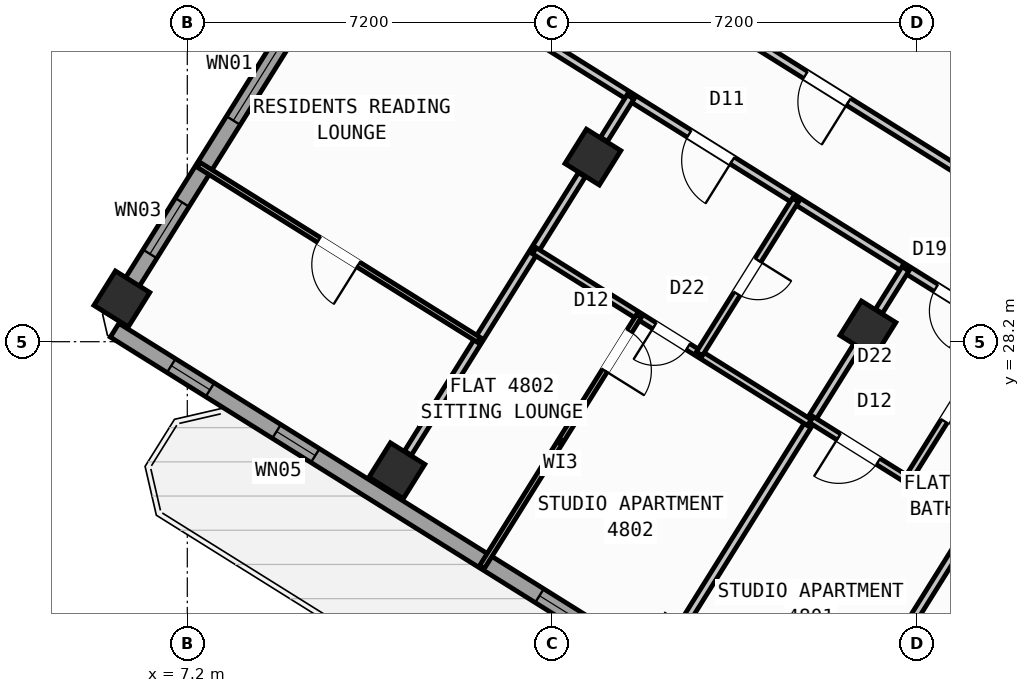
"""IFC4 building model, lengths in metres.
Left out: names, types, materials, properties, quantities, classifications, styles, units other than length and angle.
Written with IfcOpenShell. Run it as: python <this file> out.ifc"""

import sys

from ifc_helpers import new_model, si_unit, direction, frame, frame_2d, origin, origin_2d, place, context, subcontext, project, spatial, rectangle, hollow_rectangle, extrude, source, transform, mapped, element, fill, save


model = new_model("IFC4")
c1 = context("Model", 3, precision=1e-05, world=origin(), true_north=direction((0.0, 1.0)))
c2 = subcontext(c1, "Body", "Model", "MODEL_VIEW")
j1 = project(units=[si_unit("LENGTHUNIT", "METRE"), si_unit("PLANEANGLEUNIT", "RADIAN")], contexts=[c1])
p1 = place(None, origin())
s1 = spatial("IfcSite", under=j1, at=p1, CompositionType="ELEMENT")
p2 = place(p1, origin())
s2 = spatial("IfcBuilding", under=s1, at=p2, CompositionType="ELEMENT")
p3 = place(p2, frame((0.0, 0.0, 191.4)))
s3 = spatial("IfcBuildingStorey", under=s2, at=p3, CompositionType="ELEMENT", Elevation=191.4)
m1 = source(origin(), c2, "Body", "SweptSolid", [
    extrude(hollow_rectangle(XDim=0.8, YDim=0.8, WallThickness=0.032, at=origin_2d()), origin(), (0.0, 0.0, 1.0), 3.6),
])
for number, where, z_axis, x_axis in (
    (1, (20.632, 28.452, 0.0), (0.0, 0.0, 1.0), (-0.848, 0.53, 0.0)),
    (2, (15.205, 31.844, 0.0), (0.0, 0.0, 1.0), (-0.848, 0.53, 0.0)),
    (3, (11.336, 25.653, 0.0), (0.0, 0.0, 1.0), (-0.848, 0.53, 0.0)),
    (4, (5.909, 29.044, 0.0), (0.0, 0.0, 1.0), (-0.848, 0.53, 0.0)),
):
    element("IfcColumn", number, at=place(p3, frame(where, z_axis=z_axis, x_axis=x_axis)), inside=s3, PredefinedType="COLUMN", context=c2, shape_type="MappedRepresentation", body=[
        mapped(m1, transform((0.0, 0.0, 0.0), scale=1.0)),
    ])
p4 = place(p3, frame((31.76, 12.183, 0.0), z_axis=(0.0, 0.0, 1.0), x_axis=(-0.848047074256, 0.529920899612, 0.0)))
e5 = element("IfcWall", 5, at=p4, inside=s3, PredefinedType="STANDARD", context=c2, shape_type="SweptSolid", body=[
    extrude(rectangle(XDim=30.652, YDim=0.32, at=frame_2d((15.326, 0.0))), origin(), (0.0, 0.0, 1.0), 3.32),
])
p5 = place(p4, frame((15.166, 0.0, 0.0)))
e6 = element("IfcOpeningElement", 6, at=p5, cuts=e5, PredefinedType="OPENING", context=c2, shape_type="SweptSolid", body=[
    extrude(rectangle(XDim=1.2, YDim=2.15, at=frame_2d((0.6, 1.075))), frame((0.0, 0.17, 0.0), z_axis=(0.0, -1.0, 0.0), x_axis=(1.0, 0.0, 0.0)), (0.0, 0.0, 1.0), 0.34),
])
p6 = place(p4, frame((2.015, 0.0, 0.8)))
e7 = element("IfcOpeningElement", 7, at=p6, cuts=e5, PredefinedType="OPENING", context=c2, shape_type="SweptSolid", body=[
    extrude(rectangle(XDim=2.1, YDim=1.55, at=frame_2d((1.05, 0.775))), frame((0.0, 0.17, 0.0), z_axis=(0.0, -1.0, 0.0), x_axis=(1.0, 0.0, 0.0)), (0.0, 0.0, 1.0), 0.34),
])
p7 = place(p4, frame((7.244, 0.0, 0.8)))
e8 = element("IfcOpeningElement", 8, at=p7, cuts=e5, PredefinedType="OPENING", context=c2, shape_type="SweptSolid", body=[
    extrude(rectangle(XDim=2.1, YDim=1.55, at=frame_2d((1.05, 0.775))), frame((0.0, 0.17, 0.0), z_axis=(0.0, -1.0, 0.0), x_axis=(1.0, 0.0, 0.0)), (0.0, 0.0, 1.0), 0.34),
])
p8 = place(p4, frame((12.623, 0.0, 1.0)))
e9 = element("IfcOpeningElement", 9, at=p8, cuts=e5, PredefinedType="OPENING", context=c2, shape_type="SweptSolid", body=[
    extrude(rectangle(XDim=0.9, YDim=1.25, at=frame_2d((0.45, 0.625))), frame((0.0, 0.17, 0.0), z_axis=(0.0, -1.0, 0.0), x_axis=(1.0, 0.0, 0.0)), (0.0, 0.0, 1.0), 0.34),
])
p9 = place(p4, frame((19.565, 0.0, 0.95)))
e10 = element("IfcOpeningElement", 10, at=p9, cuts=e5, PredefinedType="OPENING", context=c2, shape_type="SweptSolid", body=[
    extrude(rectangle(XDim=1.2, YDim=1.4, at=frame_2d((0.6, 0.7))), frame((0.0, 0.17, 0.0), z_axis=(0.0, -1.0, 0.0), x_axis=(1.0, 0.0, 0.0)), (0.0, 0.0, 1.0), 0.34),
])
p10 = place(p4, frame((25.983, 0.0, 1.0)))
e11 = element("IfcOpeningElement", 11, at=p10, cuts=e5, PredefinedType="OPENING", context=c2, shape_type="SweptSolid", body=[
    extrude(rectangle(XDim=0.9, YDim=1.25, at=frame_2d((0.45, 0.625))), frame((0.0, 0.17, 0.0), z_axis=(0.0, -1.0, 0.0), x_axis=(1.0, 0.0, 0.0)), (0.0, 0.0, 1.0), 0.34),
])
p11 = place(p4, frame((28.433, 0.0, 1.0)))
e12 = element("IfcOpeningElement", 12, at=p11, cuts=e5, PredefinedType="OPENING", context=c2, shape_type="SweptSolid", body=[
    extrude(rectangle(XDim=0.9, YDim=1.25, at=frame_2d((0.45, 0.625))), frame((0.0, 0.17, 0.0), z_axis=(0.0, -1.0, 0.0), x_axis=(1.0, 0.0, 0.0)), (0.0, 0.0, 1.0), 0.34),
])
p12 = place(p3, frame((5.7, 28.71, 0.0), z_axis=(0.0, 0.0, 1.0), x_axis=(0.529923711467, 0.8480453172, 0.0)))
e13 = element("IfcWall", 13, at=p12, inside=s3, PredefinedType="STANDARD", context=c2, shape_type="SweptSolid", body=[
    extrude(rectangle(XDim=21.587, YDim=0.32, at=frame_2d((10.794, 0.0))), origin(), (0.0, 0.0, 1.0), 2.795),
])
p13 = place(p12, frame((1.44, 0.0, 0.95)))
e14 = element("IfcOpeningElement", 14, at=p13, cuts=e13, PredefinedType="OPENING", context=c2, shape_type="SweptSolid", body=[
    extrude(rectangle(XDim=1.2, YDim=1.4, at=frame_2d((0.6, 0.7))), frame((0.0, 0.17, 0.0), z_axis=(0.0, -1.0, 0.0), x_axis=(1.0, 0.0, 0.0)), (0.0, 0.0, 1.0), 0.34),
])
p14 = place(p12, frame((4.545, 0.0, 0.85)))
e15 = element("IfcOpeningElement", 15, at=p14, cuts=e13, PredefinedType="OPENING", context=c2, shape_type="SweptSolid", body=[
    extrude(rectangle(XDim=1.8, YDim=1.5, at=frame_2d((0.9, 0.75))), frame((0.0, 0.17, 0.0), z_axis=(0.0, -1.0, 0.0), x_axis=(1.0, 0.0, 0.0)), (0.0, 0.0, 1.0), 0.34),
])
p15 = place(p12, frame((12.139, 0.0, 1.0)))
e16 = element("IfcOpeningElement", 16, at=p15, cuts=e13, PredefinedType="OPENING", context=c2, shape_type="SweptSolid", body=[
    extrude(rectangle(XDim=0.9, YDim=1.25, at=frame_2d((0.45, 0.625))), frame((0.0, 0.17, 0.0), z_axis=(0.0, -1.0, 0.0), x_axis=(1.0, 0.0, 0.0)), (0.0, 0.0, 1.0), 0.34),
])
p16 = place(p12, frame((16.35, 0.0, 0.95)))
e17 = element("IfcOpeningElement", 17, at=p16, cuts=e13, PredefinedType="OPENING", context=c2, shape_type="SweptSolid", body=[
    extrude(rectangle(XDim=1.2, YDim=1.4, at=frame_2d((0.6, 0.7))), frame((0.0, 0.17, 0.0), z_axis=(0.0, -1.0, 0.0), x_axis=(1.0, 0.0, 0.0)), (0.0, 0.0, 1.0), 0.34),
])
p17 = place(p12, frame((18.762, 0.0, 0.95)))
e18 = element("IfcOpeningElement", 18, at=p17, cuts=e13, PredefinedType="OPENING", context=c2, shape_type="SweptSolid", body=[
    extrude(rectangle(XDim=1.2, YDim=1.4, at=frame_2d((0.6, 0.7))), frame((0.0, 0.17, 0.0), z_axis=(0.0, -1.0, 0.0), x_axis=(1.0, 0.0, 0.0)), (0.0, 0.0, 1.0), 0.34),
])
p18 = place(p3, frame((17.424, 47.083, 0.0), z_axis=(0.0, 0.0, 1.0), x_axis=(0.848049927979, -0.529916332693, 0.0)))
e19 = element("IfcWall", 19, at=p18, inside=s3, PredefinedType="STANDARD", context=c2, shape_type="SweptSolid", body=[
    extrude(rectangle(XDim=29.223, YDim=0.32, at=frame_2d((14.612, 0.0))), origin(), (0.0, 0.0, 1.0), 3.32),
])
p19 = place(p18, frame((3.764, 0.0, 0.0)))
e20 = element("IfcOpeningElement", 20, at=p19, cuts=e19, PredefinedType="OPENING", context=c2, shape_type="SweptSolid", body=[
    extrude(rectangle(XDim=1.05, YDim=2.15, at=frame_2d((0.525, 1.075))), frame((0.0, 0.17, 0.0), z_axis=(0.0, -1.0, 0.0), x_axis=(1.0, 0.0, 0.0)), (0.0, 0.0, 1.0), 0.34),
])
p20 = place(p18, frame((8.344, 0.0, 0.8)))
e21 = element("IfcOpeningElement", 21, at=p20, cuts=e19, PredefinedType="OPENING", context=c2, shape_type="SweptSolid", body=[
    extrude(rectangle(XDim=2.1, YDim=1.55, at=frame_2d((1.05, 0.775))), frame((0.0, 0.17, 0.0), z_axis=(0.0, -1.0, 0.0), x_axis=(1.0, 0.0, 0.0)), (0.0, 0.0, 1.0), 0.34),
])
p21 = place(p18, frame((13.589, 0.0, 0.85)))
e22 = element("IfcOpeningElement", 22, at=p21, cuts=e19, PredefinedType="OPENING", context=c2, shape_type="SweptSolid", body=[
    extrude(rectangle(XDim=1.8, YDim=1.5, at=frame_2d((0.9, 0.75))), frame((0.0, 0.17, 0.0), z_axis=(0.0, -1.0, 0.0), x_axis=(1.0, 0.0, 0.0)), (0.0, 0.0, 1.0), 0.34),
])
p22 = place(p18, frame((17.104, 0.0, 0.95)))
e23 = element("IfcOpeningElement", 23, at=p22, cuts=e19, PredefinedType="OPENING", context=c2, shape_type="SweptSolid", body=[
    extrude(rectangle(XDim=1.2, YDim=1.4, at=frame_2d((0.6, 0.7))), frame((0.0, 0.17, 0.0), z_axis=(0.0, -1.0, 0.0), x_axis=(1.0, 0.0, 0.0)), (0.0, 0.0, 1.0), 0.34),
])
p23 = place(p18, frame((21.214, 0.0, 0.95)))
e24 = element("IfcOpeningElement", 24, at=p23, cuts=e19, PredefinedType="OPENING", context=c2, shape_type="SweptSolid", body=[
    extrude(rectangle(XDim=1.2, YDim=1.4, at=frame_2d((0.6, 0.7))), frame((0.0, 0.17, 0.0), z_axis=(0.0, -1.0, 0.0), x_axis=(1.0, 0.0, 0.0)), (0.0, 0.0, 1.0), 0.34),
])
p24 = place(p18, frame((25.853, 0.0, 0.95)))
e25 = element("IfcOpeningElement", 25, at=p24, cuts=e19, PredefinedType="OPENING", context=c2, shape_type="SweptSolid", body=[
    extrude(rectangle(XDim=1.2, YDim=1.4, at=frame_2d((0.6, 0.7))), frame((0.0, 0.17, 0.0), z_axis=(0.0, -1.0, 0.0), x_axis=(1.0, 0.0, 0.0)), (0.0, 0.0, 1.0), 0.34),
])
p25 = place(p3, frame((24.588, 27.631, 0.0), z_axis=(0.0, 0.0, 1.0), x_axis=(-0.529914992377, -0.848050765494, 0.0)))
e26 = element("IfcWall", 26, at=p25, inside=s3, PredefinedType="PARTITIONING", context=c2, shape_type="SweptSolid", body=[
    extrude(rectangle(XDim=9.15, YDim=0.16, at=frame_2d((4.575, 0.0))), origin(), (0.0, 0.0, 1.0), 3.31),
])
p26 = place(p3, frame((25.754, 29.497, 0.0), z_axis=(0.0, 0.0, 1.0), x_axis=(-0.848045850158, 0.529922858565, 0.0)))
e27 = element("IfcWall", 27, at=p26, inside=s3, PredefinedType="PARTITIONING", context=c2, shape_type="SweptSolid", body=[
    extrude(rectangle(XDim=16.73, YDim=0.16, at=frame_2d((8.365, 0.0))), origin(), (0.0, 0.0, 1.0), 3.31),
])
p27 = place(p26, frame((2.22, 0.0, 0.0)))
e28 = element("IfcOpeningElement", 28, at=p27, cuts=e27, PredefinedType="OPENING", context=c2, shape_type="SweptSolid", body=[
    extrude(rectangle(XDim=0.86, YDim=2.05, at=frame_2d((0.43, 1.025))), frame((0.0, 0.09, 0.0), z_axis=(0.0, -1.0, 0.0), x_axis=(1.0, 0.0, 0.0)), (0.0, 0.0, 1.0), 0.18),
])
p28 = place(p26, frame((6.49, 0.0, 0.0)))
e29 = element("IfcOpeningElement", 29, at=p28, cuts=e27, PredefinedType="OPENING", context=c2, shape_type="SweptSolid", body=[
    extrude(rectangle(XDim=1.0, YDim=2.1, at=frame_2d((0.5, 1.05))), frame((0.0, 0.09, 0.0), z_axis=(0.0, -1.0, 0.0), x_axis=(1.0, 0.0, 0.0)), (0.0, 0.0, 1.0), 0.18),
])
p29 = place(p26, frame((14.304, 0.0, 0.0)))
e30 = element("IfcOpeningElement", 30, at=p29, cuts=e27, PredefinedType="OPENING", context=c2, shape_type="SweptSolid", body=[
    extrude(rectangle(XDim=1.0, YDim=2.1, at=frame_2d((0.5, 1.05))), frame((0.0, 0.09, 0.0), z_axis=(0.0, -1.0, 0.0), x_axis=(1.0, 0.0, 0.0)), (0.0, 0.0, 1.0), 0.18),
])
p30 = place(p3, frame((24.588, 27.631, 0.0), z_axis=(0.0, 0.0, 1.0), x_axis=(-0.848041752158, 0.529929416617, 0.0)))
e31 = element("IfcWall", 31, at=p30, inside=s3, PredefinedType="PARTITIONING", context=c2, shape_type="SweptSolid", body=[
    extrude(rectangle(XDim=16.73, YDim=0.16, at=frame_2d((8.365, 0.0))), origin(), (0.0, 0.0, 1.0), 3.31),
])
p31 = place(p30, frame((2.22, 0.0, 0.0)))
e32 = element("IfcOpeningElement", 32, at=p31, cuts=e31, PredefinedType="OPENING", context=c2, shape_type="SweptSolid", body=[
    extrude(rectangle(XDim=0.86, YDim=2.05, at=frame_2d((0.43, 1.025))), frame((0.0, 0.09, 0.0), z_axis=(0.0, -1.0, 0.0), x_axis=(1.0, 0.0, 0.0)), (0.0, 0.0, 1.0), 0.18),
])
p32 = place(p30, frame((7.82, 0.0, 0.0)))
e33 = element("IfcOpeningElement", 33, at=p32, cuts=e31, PredefinedType="OPENING", context=c2, shape_type="SweptSolid", body=[
    extrude(rectangle(XDim=1.0, YDim=2.1, at=frame_2d((0.5, 1.05))), frame((0.0, 0.09, 0.0), z_axis=(0.0, -1.0, 0.0), x_axis=(1.0, 0.0, 0.0)), (0.0, 0.0, 1.0), 0.18),
])
p33 = place(p30, frame((12.95, 0.0, 0.0)))
e34 = element("IfcOpeningElement", 34, at=p33, cuts=e31, PredefinedType="OPENING", context=c2, shape_type="SweptSolid", body=[
    extrude(rectangle(XDim=1.0, YDim=2.1, at=frame_2d((0.5, 1.05))), frame((0.0, 0.09, 0.0), z_axis=(0.0, -1.0, 0.0), x_axis=(1.0, 0.0, 0.0)), (0.0, 0.0, 1.0), 0.18),
])
p34 = place(p3, frame((21.374, 29.639, 0.0), z_axis=(0.0, 0.0, 1.0), x_axis=(-0.529998940003, -0.847998304005, 0.0)))
e35 = element("IfcWall", 35, at=p34, inside=s3, PredefinedType="PARTITIONING", context=c2, shape_type="SweptSolid", body=[
    extrude(rectangle(XDim=0.988, YDim=0.16, at=frame_2d((0.494, 0.0))), origin(), (0.0, 0.0, 1.0), 2.795),
])
p35 = place(p3, frame((20.414, 28.103, 0.0), z_axis=(0.0, 0.0, 1.0), x_axis=(-0.529934553702, -0.848038542045, 0.0)))
e36 = element("IfcWall", 36, at=p35, inside=s3, PredefinedType="PARTITIONING", context=c2, shape_type="SweptSolid", body=[
    extrude(rectangle(XDim=6.476, YDim=0.16, at=frame_2d((3.238, 0.0))), origin(), (0.0, 0.0, 1.0), 2.795),
])
p36 = place(p3, frame((22.728, 24.654, 0.0), z_axis=(0.0, 0.0, 1.0), x_axis=(-0.848059820872, 0.529900500304, 0.0)))
e37 = element("IfcWall", 37, at=p36, inside=s3, PredefinedType="PLUMBINGWALL", context=c2, shape_type="SweptSolid", body=[
    extrude(rectangle(XDim=3.79, YDim=0.14, at=frame_2d((1.895, 0.0))), origin(), (0.0, 0.0, 1.0), 3.31),
])
p37 = place(p36, frame((2.23, 0.0, 0.0)))
e38 = element("IfcOpeningElement", 38, at=p37, cuts=e37, PredefinedType="OPENING", context=c2, shape_type="SweptSolid", body=[
    extrude(rectangle(XDim=0.92, YDim=2.08, at=frame_2d((0.46, 1.04))), frame((0.0, 0.08, 0.0), z_axis=(0.0, -1.0, 0.0), x_axis=(1.0, 0.0, 0.0)), (0.0, 0.0, 1.0), 0.16),
])
p38 = place(p3, frame((23.273, 28.452, 0.0), z_axis=(0.0, 0.0, 1.0), x_axis=(-0.529867639402, -0.848080352747, 0.0)))
e39 = element("IfcWall", 39, at=p38, inside=s3, PredefinedType="PLUMBINGWALL", context=c2, shape_type="SweptSolid", body=[
    extrude(rectangle(XDim=3.51, YDim=0.14, at=frame_2d((1.755, 0.0))), origin(), (0.0, 0.0, 1.0), 2.935),
])
p39 = place(p38, frame((1.365, 0.0, 0.0)))
e40 = element("IfcOpeningElement", 40, at=p39, cuts=e39, PredefinedType="OPENING", context=c2, shape_type="SweptSolid", body=[
    extrude(rectangle(XDim=0.78, YDim=2.05, at=frame_2d((0.39, 1.025))), frame((0.0, 0.08, 0.0), z_axis=(0.0, -1.0, 0.0), x_axis=(1.0, 0.0, 0.0)), (0.0, 0.0, 1.0), 0.16),
])
p40 = place(p3, frame((15.946, 33.031, 0.0), z_axis=(0.0, 0.0, 1.0), x_axis=(-0.529821225456, -0.848109349704, 0.0)))
e41 = element("IfcWall", 41, at=p40, inside=s3, PredefinedType="PARTITIONING", context=c2, shape_type="SweptSolid", body=[
    extrude(rectangle(XDim=0.988, YDim=0.16, at=frame_2d((0.494, 0.0))), origin(), (0.0, 0.0, 1.0), 2.795),
])
p41 = place(p3, frame((14.986, 31.494, 0.0), z_axis=(0.0, 0.0, 1.0), x_axis=(-0.529907440938, -0.848055484057, 0.0)))
e42 = element("IfcWall", 42, at=p41, inside=s3, PredefinedType="PARTITIONING", context=c2, shape_type="SweptSolid", body=[
    extrude(rectangle(XDim=6.476, YDim=0.16, at=frame_2d((3.238, 0.0))), origin(), (0.0, 0.0, 1.0), 2.795),
])
p42 = place(p3, frame((19.477, 26.603, 0.0), z_axis=(0.0, 0.0, 1.0), x_axis=(-0.848039019877, 0.529933789039, 0.0)))
e43 = element("IfcWall", 43, at=p42, inside=s3, PredefinedType="PLUMBINGWALL", context=c2, shape_type="SweptSolid", body=[
    extrude(rectangle(XDim=6.4, YDim=0.14, at=frame_2d((3.2, 0.0))), origin(), (0.0, 0.0, 1.0), 3.31),
])
p43 = place(p42, frame((2.824, 0.0, 0.0)))
e44 = element("IfcOpeningElement", 44, at=p43, cuts=e43, PredefinedType="OPENING", context=c2, shape_type="SweptSolid", body=[
    extrude(rectangle(XDim=0.78, YDim=2.05, at=frame_2d((0.39, 1.025))), frame((0.0, 0.08, 0.0), z_axis=(0.0, -1.0, 0.0), x_axis=(1.0, 0.0, 0.0)), (0.0, 0.0, 1.0), 0.16),
])
p44 = place(p3, frame((19.203, 30.996, 0.0), z_axis=(0.0, 0.0, 1.0), x_axis=(-0.529906983049, -0.848055770169, 0.0)))
e45 = element("IfcWall", 45, at=p44, inside=s3, PredefinedType="PLUMBINGWALL", context=c2, shape_type="SweptSolid", body=[
    extrude(rectangle(XDim=3.58, YDim=0.14, at=frame_2d((1.79, 0.0))), origin(), (0.0, 0.0, 1.0), 3.31),
])
p45 = place(p44, frame((1.4, 0.0, 0.0)))
e46 = element("IfcOpeningElement", 46, at=p45, cuts=e45, PredefinedType="OPENING", context=c2, shape_type="SweptSolid", body=[
    extrude(rectangle(XDim=0.78, YDim=2.05, at=frame_2d((0.39, 1.025))), frame((0.0, 0.08, 0.0), z_axis=(0.0, -1.0, 0.0), x_axis=(1.0, 0.0, 0.0)), (0.0, 0.0, 1.0), 0.16),
])
p46 = place(p3, frame((16.112, 28.706, 0.0), z_axis=(0.0, 0.0, 1.0), x_axis=(-0.529916267533, -0.848049968695, 0.0)))
e47 = element("IfcWall", 47, at=p46, inside=s3, PredefinedType="PARTITIONING", context=c2, shape_type="SweptSolid", body=[
    extrude(rectangle(XDim=5.84, YDim=0.11, at=frame_2d((2.92, 0.0))), origin(), (0.0, 0.0, 1.0), 3.31),
])
p47 = place(p46, frame((0.35, 0.0, 0.0)))
e48 = element("IfcOpeningElement", 48, at=p47, cuts=e47, PredefinedType="OPENING", context=c2, shape_type="SweptSolid", body=[
    extrude(rectangle(XDim=0.92, YDim=2.08, at=frame_2d((0.46, 1.04))), frame((0.0, 0.065, 0.0), z_axis=(0.0, -1.0, 0.0), x_axis=(1.0, 0.0, 0.0)), (0.0, 0.0, 1.0), 0.13),
])
p48 = place(p3, frame((12.951, 28.238, 0.0), z_axis=(0.0, 0.0, 1.0), x_axis=(-0.848031959833, 0.529945086874, 0.0)))
e49 = element("IfcWall", 49, at=p48, inside=s3, PredefinedType="PARTITIONING", context=c2, shape_type="SweptSolid", body=[
    extrude(rectangle(XDim=6.52, YDim=0.11, at=frame_2d((3.26, 0.0))), origin(), (0.0, 0.0, 1.0), 3.31),
])
p49 = place(p48, frame((2.8, 0.0, 0.0)))
e50 = element("IfcOpeningElement", 50, at=p49, cuts=e49, PredefinedType="OPENING", context=c2, shape_type="SweptSolid", body=[
    extrude(rectangle(XDim=0.92, YDim=2.08, at=frame_2d((0.46, 1.04))), frame((0.0, 0.065, 0.0), z_axis=(0.0, -1.0, 0.0), x_axis=(1.0, 0.0, 0.0)), (0.0, 0.0, 1.0), 0.13),
])
m2 = source(origin(), c2, "Body", "SweptSolid", [
    extrude(rectangle(XDim=1.2, YDim=1.4, at=frame_2d((0.6, 0.7))), frame((0.0, 0.03, 0.0), z_axis=(0.0, -1.0, 0.0), x_axis=(1.0, 0.0, 0.0)), (0.0, 0.0, 1.0), 0.06),
])
p50 = place(p9, origin())
e51 = element("IfcWindow", 51, at=p50, inside=s3, PartitioningType="SINGLE_PANEL", PredefinedType="WINDOW", context=c2, shape_type="MappedRepresentation", body=[
    mapped(m2, transform((0.0, 0.0, 0.0), scale=1.0)),
])
fill(e10, e51)
m3 = source(origin(), c2, "Body", "SweptSolid", [
    extrude(rectangle(XDim=0.9, YDim=1.25, at=frame_2d((0.45, 0.625))), frame((0.0, 0.03, 0.0), z_axis=(0.0, -1.0, 0.0), x_axis=(1.0, 0.0, 0.0)), (0.0, 0.0, 1.0), 0.06),
])
p51 = place(p10, origin())
e52 = element("IfcWindow", 52, at=p51, inside=s3, PartitioningType="SINGLE_PANEL", PredefinedType="WINDOW", context=c2, shape_type="MappedRepresentation", body=[
    mapped(m3, transform((0.0, 0.0, 0.0), scale=1.0)),
])
fill(e11, e52)
p52 = place(p11, origin())
e53 = element("IfcWindow", 53, at=p52, inside=s3, PartitioningType="SINGLE_PANEL", PredefinedType="WINDOW", context=c2, shape_type="MappedRepresentation", body=[
    mapped(m3, transform((0.0, 0.0, 0.0), scale=1.0)),
])
fill(e12, e53)
p53 = place(p13, origin())
e54 = element("IfcWindow", 54, at=p53, inside=s3, PartitioningType="SINGLE_PANEL", PredefinedType="WINDOW", context=c2, shape_type="MappedRepresentation", body=[
    mapped(m2, transform((0.0, 0.0, 0.0), scale=1.0)),
])
fill(e14, e54)
m4 = source(origin(), c2, "Body", "SweptSolid", [
    extrude(rectangle(XDim=1.8, YDim=1.5, at=frame_2d((0.9, 0.75))), frame((0.0, 0.03, 0.0), z_axis=(0.0, -1.0, 0.0), x_axis=(1.0, 0.0, 0.0)), (0.0, 0.0, 1.0), 0.06),
])
p54 = place(p14, origin())
e55 = element("IfcWindow", 55, at=p54, inside=s3, PartitioningType="SINGLE_PANEL", PredefinedType="WINDOW", context=c2, shape_type="MappedRepresentation", body=[
    mapped(m4, transform((0.0, 0.0, 0.0), scale=1.0)),
])
fill(e15, e55)
m5 = source(origin(), c2, "Body", "SweptSolid", [
    extrude(rectangle(XDim=0.86, YDim=2.05, at=frame_2d((0.43, 1.025))), frame((0.0, 0.025, 0.0), z_axis=(0.0, -1.0, 0.0), x_axis=(1.0, 0.0, 0.0)), (0.0, 0.0, 1.0), 0.05),
])
p55 = place(p31, origin())
e56 = element("IfcDoor", 56, at=p55, inside=s3, OperationType="SINGLE_SWING_LEFT", PredefinedType="DOOR", context=c2, shape_type="MappedRepresentation", body=[
    mapped(m5, transform((0.0, 0.0, 0.0), scale=1.0)),
])
fill(e32, e56)
m6 = source(origin(), c2, "Body", "SweptSolid", [
    extrude(rectangle(XDim=0.92, YDim=2.08, at=frame_2d((0.46, 1.04))), frame((0.0, 0.025, 0.0), z_axis=(0.0, -1.0, 0.0), x_axis=(1.0, 0.0, 0.0)), (0.0, 0.0, 1.0), 0.05),
])
p56 = place(p37, origin())
e57 = element("IfcDoor", 57, at=p56, inside=s3, OperationType="SINGLE_SWING_RIGHT", PredefinedType="DOOR", context=c2, shape_type="MappedRepresentation", body=[
    mapped(m6, transform((0.0, 0.0, 0.0), scale=1.0)),
])
fill(e38, e57)
m7 = source(origin(), c2, "Body", "SweptSolid", [
    extrude(rectangle(XDim=0.78, YDim=2.05, at=frame_2d((0.39, 1.025))), frame((0.0, 0.025, 0.0), z_axis=(0.0, -1.0, 0.0), x_axis=(1.0, 0.0, 0.0)), (0.0, 0.0, 1.0), 0.05),
])
p57 = place(p39, origin())
e58 = element("IfcDoor", 58, at=p57, inside=s3, OperationType="SINGLE_SWING_LEFT", PredefinedType="DOOR", context=c2, shape_type="MappedRepresentation", body=[
    mapped(m7, transform((0.0, 0.0, 0.0), scale=1.0)),
])
fill(e40, e58)
p58 = place(p47, origin())
e59 = element("IfcDoor", 59, at=p58, inside=s3, OperationType="SINGLE_SWING_RIGHT", PredefinedType="DOOR", context=c2, shape_type="MappedRepresentation", body=[
    mapped(m6, transform((0.0, 0.0, 0.0), scale=1.0)),
])
fill(e48, e59)
m8 = source(origin(), c2, "Body", "SweptSolid", [
    extrude(rectangle(XDim=1.0, YDim=2.1, at=frame_2d((0.5, 1.05))), frame((0.0, 0.025, 0.0), z_axis=(0.0, -1.0, 0.0), x_axis=(1.0, 0.0, 0.0)), (0.0, 0.0, 1.0), 0.05),
])
p59 = place(p32, origin())
e60 = element("IfcDoor", 60, at=p59, inside=s3, OperationType="SINGLE_SWING_LEFT", PredefinedType="DOOR", context=c2, shape_type="MappedRepresentation", body=[
    mapped(m8, transform((0.0, 0.0, 0.0), scale=1.0)),
])
fill(e33, e60)
p60 = place(p43, origin())
e61 = element("IfcDoor", 61, at=p60, inside=s3, OperationType="SINGLE_SWING_RIGHT", PredefinedType="DOOR", context=c2, shape_type="MappedRepresentation", body=[
    mapped(m7, transform((0.0, 0.0, 0.0), scale=1.0)),
])
fill(e44, e61)
p61 = place(p45, origin())
e62 = element("IfcDoor", 62, at=p61, inside=s3, OperationType="SINGLE_SWING_LEFT", PredefinedType="DOOR", context=c2, shape_type="MappedRepresentation", body=[
    mapped(m7, transform((0.0, 0.0, 0.0), scale=1.0)),
])
fill(e46, e62)
p62 = place(p49, origin())
e63 = element("IfcDoor", 63, at=p62, inside=s3, OperationType="SINGLE_SWING_LEFT", PredefinedType="DOOR", context=c2, shape_type="MappedRepresentation", body=[
    mapped(m6, transform((0.0, 0.0, 0.0), scale=1.0)),
])
fill(e50, e63)
p63 = place(p28, origin())
e64 = element("IfcDoor", 64, at=p63, inside=s3, OperationType="SINGLE_SWING_LEFT", PredefinedType="DOOR", context=c2, shape_type="MappedRepresentation", body=[
    mapped(m8, transform((0.0, 0.0, 0.0), scale=1.0)),
])
fill(e29, e64)
save(model, sys.argv[1])
